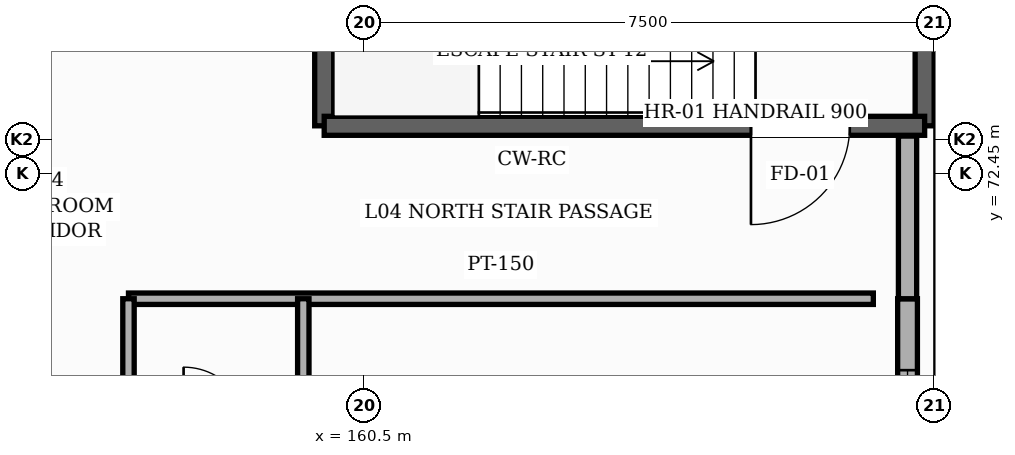
"""IFC4 building model, lengths in metres.
Left out: names, types, materials, properties, quantities, classifications, styles, units other than length and angle.
Written with IfcOpenShell. Run it as: python <this file> out.ifc"""

import sys

from ifc_helpers import new_model, si_unit, direction, frame, frame_2d, origin, place, context, subcontext, project, spatial, rectangle, extrude, element, fill, save


model = new_model("IFC4")
c1 = context("Model", 3, precision=1e-05, world=origin(), true_north=direction((0.0, 1.0)))
c2 = subcontext(c1, "Body", "Model", "MODEL_VIEW")
j1 = project(units=[si_unit("LENGTHUNIT", "METRE"), si_unit("PLANEANGLEUNIT", "RADIAN")], contexts=[c1])
p1 = place(None, origin())
s1 = spatial("IfcSite", under=j1, at=p1, CompositionType="ELEMENT")
p2 = place(p1, origin())
s2 = spatial("IfcBuilding", under=s1, at=p2, CompositionType="ELEMENT")
p3 = place(p2, frame((0.0, 0.0, 19.8)))
s3 = spatial("IfcBuildingStorey", under=s2, at=p3, CompositionType="ELEMENT", Elevation=19.8)
p4 = place(p3, frame((167.65, 70.8, 0.0), z_axis=(0.0, 0.0, 1.0), x_axis=(0.0, -1.0, 0.0)))
e1 = element("IfcWall", 1, at=p4, inside=s3, PredefinedType="SOLIDWALL", context=c2, shape_type="SweptSolid", body=[
    extrude(rectangle(XDim=6.025, YDim=0.26, at=frame_2d((3.013, 0.0))), origin(), (0.0, 0.0, 1.0), 4.565),
])
p5 = place(p4, frame((4.05, 0.0, 0.85)))
e2 = element("IfcOpeningElement", 2, at=p5, cuts=e1, PredefinedType="OPENING", context=c2, shape_type="SweptSolid", body=[
    extrude(rectangle(XDim=1.65, YDim=1.35, at=frame_2d((0.825, 0.675))), frame((0.0, 0.14, 0.0), z_axis=(0.0, -1.0, 0.0), x_axis=(1.0, 0.0, 0.0)), (0.0, 0.0, 1.0), 0.28),
])
p6 = place(p4, frame((0.94, 0.0, 0.85)))
e3 = element("IfcOpeningElement", 3, at=p6, cuts=e1, PredefinedType="OPENING", context=c2, shape_type="SweptSolid", body=[
    extrude(rectangle(XDim=1.85, YDim=1.35, at=frame_2d((0.925, 0.675))), frame((0.0, 0.14, 0.0), z_axis=(0.0, -1.0, 0.0), x_axis=(1.0, 0.0, 0.0)), (0.0, 0.0, 1.0), 0.28),
])
p7 = place(p3, frame((167.65, 72.94, 0.0), z_axis=(0.0, 0.0, 1.0), x_axis=(0.0, -1.0, 0.0)))
e4 = element("IfcWall", 4, at=p7, inside=s3, PredefinedType="SOLIDWALL", context=c2, shape_type="SweptSolid", body=[
    extrude(rectangle(XDim=2.14, YDim=0.24, at=frame_2d((1.07, 0.0))), origin(), (0.0, 0.0, 1.0), 4.565),
])
for number, where, z_axis, x_axis in (
    (5, (167.875, 76.425, 0.0), (0.0, 0.0, 1.0), (0.0, -1.0, 0.0)),
    (6, (159.975, 73.075, 0.0), (0.0, 0.0, 1.0), (0.0, 1.0, 0.0)),
):
    element("IfcWall", number, at=place(p3, frame(where, z_axis=z_axis, x_axis=x_axis)), inside=s3, PredefinedType="SHEAR", context=c2, shape_type="SweptSolid", body=[
        extrude(rectangle(XDim=3.35, YDim=0.25, at=frame_2d((1.675, 0.0))), origin(), (0.0, 0.0, 1.0), 4.58),
    ])
p8 = place(p3, frame((167.875, 73.075, 0.0), z_axis=(0.0, 0.0, 1.0), x_axis=(-1.0, 0.0, 0.0)))
e7 = element("IfcWall", 7, at=p8, inside=s3, PredefinedType="SHEAR", context=c2, shape_type="SweptSolid", body=[
    extrude(rectangle(XDim=7.9, YDim=0.25, at=frame_2d((3.95, 0.0))), origin(), (0.0, 0.0, 1.0), 4.58),
])
p9 = place(p8, frame((0.985, 0.0, 0.0)))
e8 = element("IfcOpeningElement", 8, at=p9, cuts=e7, PredefinedType="OPENING", context=c2, shape_type="SweptSolid", body=[
    extrude(rectangle(XDim=1.3, YDim=2.2, at=frame_2d((0.65, 1.1))), frame((0.0, 0.135, 0.0), z_axis=(0.0, -1.0, 0.0), x_axis=(1.0, 0.0, 0.0)), (0.0, 0.0, 1.0), 0.27),
])
p10 = place(p3, frame((157.4, 70.8, 0.0), z_axis=(0.0, 0.0, 1.0), x_axis=(1.0, 0.0, 0.0)))
e9 = element("IfcWall", 9, at=p10, inside=s3, PredefinedType="PARTITIONING", context=c2, shape_type="SweptSolid", body=[
    extrude(rectangle(XDim=9.8, YDim=0.15, at=frame_2d((4.9, 0.0))), origin(), (0.0, 0.0, 1.0), 4.565),
])
p11 = place(p3, frame((157.4, 22.3, 0.0), z_axis=(0.0, 0.0, 1.0), x_axis=(0.0, 1.0, 0.0)))
e10 = element("IfcWall", 10, at=p11, inside=s3, PredefinedType="PARTITIONING", context=c2, shape_type="SweptSolid", body=[
    extrude(rectangle(XDim=48.5, YDim=0.15, at=frame_2d((24.25, 0.0))), origin(), (0.0, 0.0, 1.0), 4.565),
])
p12 = place(p11, frame((0.515, 0.0, 0.0)))
e11 = element("IfcOpeningElement", 11, at=p12, cuts=e10, PredefinedType="OPENING", context=c2, shape_type="SweptSolid", body=[
    extrude(rectangle(XDim=0.95, YDim=2.15, at=frame_2d((0.475, 1.075))), frame((0.0, 0.085, 0.0), z_axis=(0.0, -1.0, 0.0), x_axis=(1.0, 0.0, 0.0)), (0.0, 0.0, 1.0), 0.17),
])
p13 = place(p11, frame((4.245, 0.0, 0.0)))
e12 = element("IfcOpeningElement", 12, at=p13, cuts=e10, PredefinedType="OPENING", context=c2, shape_type="SweptSolid", body=[
    extrude(rectangle(XDim=0.95, YDim=2.15, at=frame_2d((0.475, 1.075))), frame((0.0, 0.085, 0.0), z_axis=(0.0, -1.0, 0.0), x_axis=(1.0, 0.0, 0.0)), (0.0, 0.0, 1.0), 0.17),
])
p14 = place(p11, frame((7.975, 0.0, 0.0)))
e13 = element("IfcOpeningElement", 13, at=p14, cuts=e10, PredefinedType="OPENING", context=c2, shape_type="SweptSolid", body=[
    extrude(rectangle(XDim=0.95, YDim=2.15, at=frame_2d((0.475, 1.075))), frame((0.0, 0.085, 0.0), z_axis=(0.0, -1.0, 0.0), x_axis=(1.0, 0.0, 0.0)), (0.0, 0.0, 1.0), 0.17),
])
p15 = place(p11, frame((11.71, 0.0, 0.0)))
e14 = element("IfcOpeningElement", 14, at=p15, cuts=e10, PredefinedType="OPENING", context=c2, shape_type="SweptSolid", body=[
    extrude(rectangle(XDim=0.95, YDim=2.15, at=frame_2d((0.475, 1.075))), frame((0.0, 0.085, 0.0), z_axis=(0.0, -1.0, 0.0), x_axis=(1.0, 0.0, 0.0)), (0.0, 0.0, 1.0), 0.17),
])
p16 = place(p11, frame((15.44, 0.0, 0.0)))
e15 = element("IfcOpeningElement", 15, at=p16, cuts=e10, PredefinedType="OPENING", context=c2, shape_type="SweptSolid", body=[
    extrude(rectangle(XDim=0.95, YDim=2.15, at=frame_2d((0.475, 1.075))), frame((0.0, 0.085, 0.0), z_axis=(0.0, -1.0, 0.0), x_axis=(1.0, 0.0, 0.0)), (0.0, 0.0, 1.0), 0.17),
])
p17 = place(p11, frame((19.17, 0.0, 0.0)))
e16 = element("IfcOpeningElement", 16, at=p17, cuts=e10, PredefinedType="OPENING", context=c2, shape_type="SweptSolid", body=[
    extrude(rectangle(XDim=0.95, YDim=2.15, at=frame_2d((0.475, 1.075))), frame((0.0, 0.085, 0.0), z_axis=(0.0, -1.0, 0.0), x_axis=(1.0, 0.0, 0.0)), (0.0, 0.0, 1.0), 0.17),
])
p18 = place(p11, frame((22.9, 0.0, 0.0)))
e17 = element("IfcOpeningElement", 17, at=p18, cuts=e10, PredefinedType="OPENING", context=c2, shape_type="SweptSolid", body=[
    extrude(rectangle(XDim=0.95, YDim=2.15, at=frame_2d((0.475, 1.075))), frame((0.0, 0.085, 0.0), z_axis=(0.0, -1.0, 0.0), x_axis=(1.0, 0.0, 0.0)), (0.0, 0.0, 1.0), 0.17),
])
p19 = place(p11, frame((26.63, 0.0, 0.0)))
e18 = element("IfcOpeningElement", 18, at=p19, cuts=e10, PredefinedType="OPENING", context=c2, shape_type="SweptSolid", body=[
    extrude(rectangle(XDim=0.95, YDim=2.15, at=frame_2d((0.475, 1.075))), frame((0.0, 0.085, 0.0), z_axis=(0.0, -1.0, 0.0), x_axis=(1.0, 0.0, 0.0)), (0.0, 0.0, 1.0), 0.17),
])
p20 = place(p11, frame((30.36, 0.0, 0.0)))
e19 = element("IfcOpeningElement", 19, at=p20, cuts=e10, PredefinedType="OPENING", context=c2, shape_type="SweptSolid", body=[
    extrude(rectangle(XDim=0.95, YDim=2.15, at=frame_2d((0.475, 1.075))), frame((0.0, 0.085, 0.0), z_axis=(0.0, -1.0, 0.0), x_axis=(1.0, 0.0, 0.0)), (0.0, 0.0, 1.0), 0.17),
])
p21 = place(p11, frame((34.09, 0.0, 0.0)))
e20 = element("IfcOpeningElement", 20, at=p21, cuts=e10, PredefinedType="OPENING", context=c2, shape_type="SweptSolid", body=[
    extrude(rectangle(XDim=0.95, YDim=2.15, at=frame_2d((0.475, 1.075))), frame((0.0, 0.085, 0.0), z_axis=(0.0, -1.0, 0.0), x_axis=(1.0, 0.0, 0.0)), (0.0, 0.0, 1.0), 0.17),
])
p22 = place(p11, frame((37.825, 0.0, 0.0)))
e21 = element("IfcOpeningElement", 21, at=p22, cuts=e10, PredefinedType="OPENING", context=c2, shape_type="SweptSolid", body=[
    extrude(rectangle(XDim=0.95, YDim=2.15, at=frame_2d((0.475, 1.075))), frame((0.0, 0.085, 0.0), z_axis=(0.0, -1.0, 0.0), x_axis=(1.0, 0.0, 0.0)), (0.0, 0.0, 1.0), 0.17),
])
p23 = place(p11, frame((41.555, 0.0, 0.0)))
e22 = element("IfcOpeningElement", 22, at=p23, cuts=e10, PredefinedType="OPENING", context=c2, shape_type="SweptSolid", body=[
    extrude(rectangle(XDim=0.95, YDim=2.15, at=frame_2d((0.475, 1.075))), frame((0.0, 0.085, 0.0), z_axis=(0.0, -1.0, 0.0), x_axis=(1.0, 0.0, 0.0)), (0.0, 0.0, 1.0), 0.17),
])
p24 = place(p11, frame((45.285, 0.0, 0.0)))
e23 = element("IfcOpeningElement", 23, at=p24, cuts=e10, PredefinedType="OPENING", context=c2, shape_type="SweptSolid", body=[
    extrude(rectangle(XDim=0.95, YDim=2.15, at=frame_2d((0.475, 1.075))), frame((0.0, 0.085, 0.0), z_axis=(0.0, -1.0, 0.0), x_axis=(1.0, 0.0, 0.0)), (0.0, 0.0, 1.0), 0.17),
])
p25 = place(p3, frame((159.7, 69.05, 0.0), z_axis=(0.0, 0.0, 1.0), x_axis=(0.0, 1.0, 0.0)))
e24 = element("IfcWall", 24, at=p25, inside=s3, PredefinedType="PARTITIONING", context=c2, shape_type="SweptSolid", body=[
    extrude(rectangle(XDim=1.75, YDim=0.15, at=frame_2d((0.875, 0.0))), origin(), (0.0, 0.0, 1.0), 4.565),
])
p26 = place(p6, origin())
e25 = element("IfcWindow", 25, at=p26, inside=s3, PartitioningType="SINGLE_PANEL", PredefinedType="WINDOW", context=c2, shape_type="SweptSolid", body=[
    extrude(rectangle(XDim=1.85, YDim=1.35, at=frame_2d((0.925, 0.675))), frame((0.0, 0.03, 0.0), z_axis=(0.0, -1.0, 0.0), x_axis=(1.0, 0.0, 0.0)), (0.0, 0.0, 1.0), 0.06),
])
fill(e3, e25)
p27 = place(p9, origin())
e26 = element("IfcDoor", 26, at=p27, inside=s3, OperationType="SINGLE_SWING_RIGHT", PredefinedType="DOOR", context=c2, shape_type="SweptSolid", body=[
    extrude(rectangle(XDim=1.3, YDim=2.2, at=frame_2d((0.65, 1.1))), frame((0.0, 0.025, 0.0), z_axis=(0.0, -1.0, 0.0), x_axis=(1.0, 0.0, 0.0)), (0.0, 0.0, 1.0), 0.05),
])
fill(e8, e26)
save(model, sys.argv[1])
